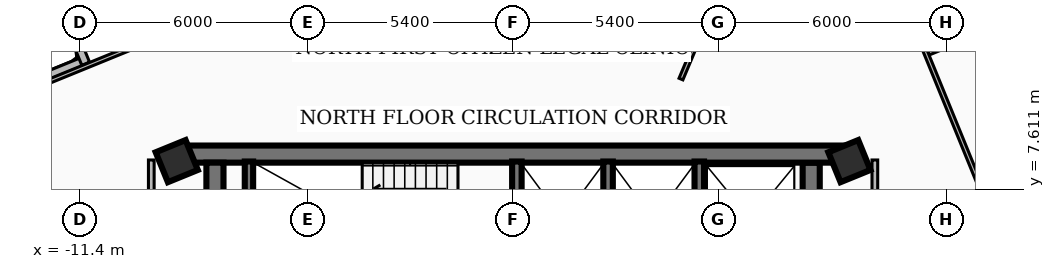
"""IFC4 building model, lengths in metres.
Left out: names, types, materials, properties, quantities, classifications, styles, units other than length and angle.
Written with IfcOpenShell. Run it as: python <this file> out.ifc"""

import sys

from ifc_helpers import new_model, si_unit, direction, frame, frame_2d, origin, origin_2d, place, context, subcontext, project, spatial, rectangle, extrude, element, save


model = new_model("IFC4")
c1 = context("Model", 3, precision=1e-05, world=origin(), true_north=direction((0.0, 1.0)))
c2 = subcontext(c1, "Body", "Model", "MODEL_VIEW")
j1 = project(units=[si_unit("LENGTHUNIT", "METRE"), si_unit("PLANEANGLEUNIT", "RADIAN")], contexts=[c1])
p1 = place(None, origin())
s1 = spatial("IfcSite", under=j1, at=p1, CompositionType="ELEMENT")
p2 = place(p1, origin())
s2 = spatial("IfcBuilding", under=s1, at=p2, CompositionType="ELEMENT")
p3 = place(p2, frame((0.0, 0.0, 173.88)))
s3 = spatial("IfcBuildingStorey", under=s2, at=p3, CompositionType="ELEMENT", Elevation=173.88)
p4 = place(p3, frame((-8.78, 8.535, 0.0), z_axis=(0.0, 0.0, 1.0), x_axis=(1.0, 0.0, 0.0)))
e1 = element("IfcWall", 1, at=p4, inside=s3, PredefinedType="SHEAR", context=c2, shape_type="SweptSolid", body=[
    extrude(rectangle(XDim=17.56, YDim=0.45, at=frame_2d((8.78, 0.0))), origin(), (0.0, 0.0, 1.0), 3.34),
])
for number, where, z_axis, x_axis in (
    (2, (-7.845, 1.975, 0.0), (0.0, 0.0, 1.0), (0.0, 1.0, 0.0)),
    (3, (7.845, 8.31, 0.0), (0.0, 0.0, 1.0), (0.0, -1.0, 0.0)),
):
    element("IfcWall", number, at=place(p3, frame(where, z_axis=z_axis, x_axis=x_axis)), inside=s3, PredefinedType="SHEAR", context=c2, shape_type="SweptSolid", body=[
        extrude(rectangle(XDim=6.335, YDim=0.45, at=frame_2d((3.167, 0.0))), origin(), (0.0, 0.0, 1.0), 3.34),
    ])
p5 = place(p3, frame((-6.95, 5.28, 0.0), z_axis=(0.0, 0.0, 1.0), x_axis=(0.0, 1.0, 0.0)))
e4 = element("IfcWall", 4, at=p5, inside=s3, PredefinedType="SOLIDWALL", context=c2, shape_type="SweptSolid", body=[
    extrude(rectangle(XDim=3.06, YDim=0.22, at=frame_2d((1.53, 0.0))), origin(), (0.0, 0.0, 1.0), 3.34),
])
for number, where, z_axis, x_axis in (
    (5, (0.1, 5.3, 0.0), (0.0, 0.0, 1.0), (0.0, 1.0, 0.0)),
    (6, (2.5, 5.3, 0.0), (0.0, 0.0, 1.0), (0.0, 1.0, 0.0)),
    (7, (4.9, 5.3, 0.0), (0.0, 0.0, 1.0), (0.0, 1.0, 0.0)),
):
    element("IfcWall", number, at=place(p3, frame(where, z_axis=z_axis, x_axis=x_axis)), inside=s3, PredefinedType="SOLIDWALL", context=c2, shape_type="SweptSolid", body=[
        extrude(rectangle(XDim=3.04, YDim=0.25, at=frame_2d((1.52, 0.0))), origin(), (0.0, 0.0, 1.0), 3.34),
    ])
for number, where, z_axis, x_axis in (
    (8, (-8.85, 8.35, 0.0), (0.0, 0.0, 1.0), (0.926, 0.378, 0.0)),
    (9, (8.85, 8.35, 0.0), (0.0, 0.0, 1.0), (0.926, 0.378, 0.0)),
):
    element("IfcColumn", number, at=place(p3, frame(where, z_axis=z_axis, x_axis=x_axis)), inside=s3, PredefinedType="COLUMN", context=c2, shape_type="SweptSolid", body=[
        extrude(rectangle(XDim=0.85, YDim=0.85, at=origin_2d()), origin(), (0.0, 0.0, 1.0), 3.6),
    ])
p6 = place(p3, frame((-17.456, 8.473, 0.0), z_axis=(0.0, 0.0, 1.0), x_axis=(0.925916493636, 0.377728271133, 0.0)))
e10 = element("IfcWall", 10, at=p6, inside=s3, PredefinedType="SOLIDWALL", context=c2, shape_type="SweptSolid", body=[
    extrude(rectangle(XDim=6.759, YDim=0.22, at=frame_2d((3.379, 0.0))), origin(), (0.0, 0.0, 1.0), 3.34),
])
p7 = place(p3, frame((-11.246, 10.912, 0.0), z_axis=(0.0, 0.0, 1.0), x_axis=(-0.37779924707, 0.92588753578, 0.0)))
e11 = element("IfcWall", 11, at=p7, inside=s3, PredefinedType="SOLIDWALL", context=c2, shape_type="SweptSolid", body=[
    extrude(rectangle(XDim=8.258, YDim=0.22, at=frame_2d((4.129, 0.0))), origin(), (0.0, 0.0, 1.0), 3.34),
])
p8 = place(p7, frame((3.35, 0.0, 0.85)))
e12 = element("IfcOpeningElement", 12, at=p8, cuts=e11, PredefinedType="OPENING", context=c2, shape_type="SweptSolid", body=[
    extrude(rectangle(XDim=2.4, YDim=1.65, at=frame_2d((1.2, 0.825))), frame((0.0, 0.12, 0.0), z_axis=(0.0, -1.0, 0.0), x_axis=(1.0, 0.0, 0.0)), (0.0, 0.0, 1.0), 0.24),
])
p9 = place(p3, frame((8.473, 17.456, 0.0), z_axis=(0.0, 0.0, 1.0), x_axis=(0.377728271133, -0.925916493636, 0.0)))
e13 = element("IfcWall", 13, at=p9, inside=s3, PredefinedType="SOLIDWALL", context=c2, shape_type="SweptSolid", body=[
    extrude(rectangle(XDim=6.759, YDim=0.22, at=frame_2d((3.379, 0.0))), origin(), (0.0, 0.0, 1.0), 2.644),
])
p10 = place(p3, frame((10.912, 11.246, 0.0), z_axis=(0.0, 0.0, 1.0), x_axis=(0.925863027914, 0.377859303897, 0.0)))
e14 = element("IfcWall", 14, at=p10, inside=s3, PredefinedType="SOLIDWALL", context=c2, shape_type="SweptSolid", body=[
    extrude(rectangle(XDim=9.858, YDim=0.22, at=frame_2d((4.929, 0.0))), origin(), (0.0, 0.0, 1.0), 2.644),
])
p11 = place(p10, frame((4.4, 0.0, 0.0)))
e15 = element("IfcOpeningElement", 15, at=p11, cuts=e14, PredefinedType="OPENING", context=c2, shape_type="SweptSolid", body=[
    extrude(rectangle(XDim=1.1, YDim=2.1, at=frame_2d((0.55, 1.05))), frame((0.0, 0.12, 0.0), z_axis=(0.0, -1.0, 0.0), x_axis=(1.0, 0.0, 0.0)), (0.0, 0.0, 1.0), 0.24),
])
p12 = place(p3, frame((-9.52, 1.75, 0.0), z_axis=(0.0, 0.0, 1.0), x_axis=(0.0, 1.0, 0.0)))
e16 = element("IfcWall", 16, at=p12, inside=s3, PredefinedType="PARTITIONING", context=c2, shape_type="SweptSolid", body=[
    extrude(rectangle(XDim=6.63, YDim=0.15, at=frame_2d((3.315, 0.0))), origin(), (0.0, 0.0, 1.0), 3.34),
])
p13 = place(p3, frame((9.52, 1.75, 0.0), z_axis=(0.0, 0.0, 1.0), x_axis=(0.0, 1.0, 0.0)))
e17 = element("IfcWall", 17, at=p13, inside=s3, PredefinedType="PARTITIONING", context=c2, shape_type="SweptSolid", body=[
    extrude(rectangle(XDim=6.63, YDim=0.15, at=frame_2d((3.315, 0.0))), origin(), (0.0, 0.0, 1.0), 2.644),
])
p14 = place(p3, frame((4.418, 10.509, 0.0), z_axis=(0.0, 0.0, 1.0), x_axis=(0.387471247296, 0.921881788799, 0.0)))
e18 = element("IfcWall", 18, at=p14, inside=s3, PredefinedType="PARTITIONING", context=c2, shape_type="SweptSolid", body=[
    extrude(rectangle(XDim=8.274, YDim=0.11, at=frame_2d((4.137, 0.0))), origin(), (0.0, 0.0, 1.0), 2.644),
])
p15 = place(p3, frame((-11.3, 4.75, 0.0), z_axis=(0.0, 0.0, 1.0), x_axis=(-0.92186077199, 0.387521247245, 0.0)))
e19 = element("IfcWall", 19, at=p15, inside=s3, PredefinedType="PARTITIONING", context=c2, shape_type="SweptSolid", body=[
    extrude(rectangle(XDim=7.417, YDim=0.11, at=frame_2d((3.708, 0.0))), origin(), (0.0, 0.0, 1.0), 3.34),
])
p16 = place(p3, frame((9.323, 14.973, 0.0), z_axis=(0.0, 0.0, 1.0), x_axis=(0.377891753295, -0.92584978414, 0.0)))
e20 = element("IfcWall", 20, at=p16, inside=s3, PredefinedType="PARTITIONING", context=c2, shape_type="SweptSolid", body=[
    extrude(rectangle(XDim=20.361, YDim=0.11, at=frame_2d((10.18, 0.0))), origin(), (0.0, 0.0, 1.0), 2.644),
])
p17 = place(p16, frame((9.741, 0.0, 0.0)))
e21 = element("IfcOpeningElement", 21, at=p17, cuts=e20, PredefinedType="OPENING", context=c2, shape_type="SweptSolid", body=[
    extrude(rectangle(XDim=1.2, YDim=2.1, at=frame_2d((0.6, 1.05))), frame((0.0, 0.065, 0.0), z_axis=(0.0, -1.0, 0.0), x_axis=(1.0, 0.0, 0.0)), (0.0, 0.0, 1.0), 0.13),
])
p18 = place(p3, frame((-14.973, 9.323, 0.0), z_axis=(0.0, 0.0, 1.0), x_axis=(0.92584978414, 0.377891753295, 0.0)))
e22 = element("IfcWall", 22, at=p18, inside=s3, PredefinedType="PARTITIONING", context=c2, shape_type="SweptSolid", body=[
    extrude(rectangle(XDim=20.361, YDim=0.11, at=frame_2d((10.18, 0.0))), origin(), (0.0, 0.0, 1.0), 2.644),
])
p19 = place(p18, frame((9.741, 0.0, 0.0)))
e23 = element("IfcOpeningElement", 23, at=p19, cuts=e22, PredefinedType="OPENING", context=c2, shape_type="SweptSolid", body=[
    extrude(rectangle(XDim=1.2, YDim=2.1, at=frame_2d((0.6, 1.05))), frame((0.0, 0.065, 0.0), z_axis=(0.0, -1.0, 0.0), x_axis=(1.0, 0.0, 0.0)), (0.0, 0.0, 1.0), 0.13),
])
save(model, sys.argv[1])
